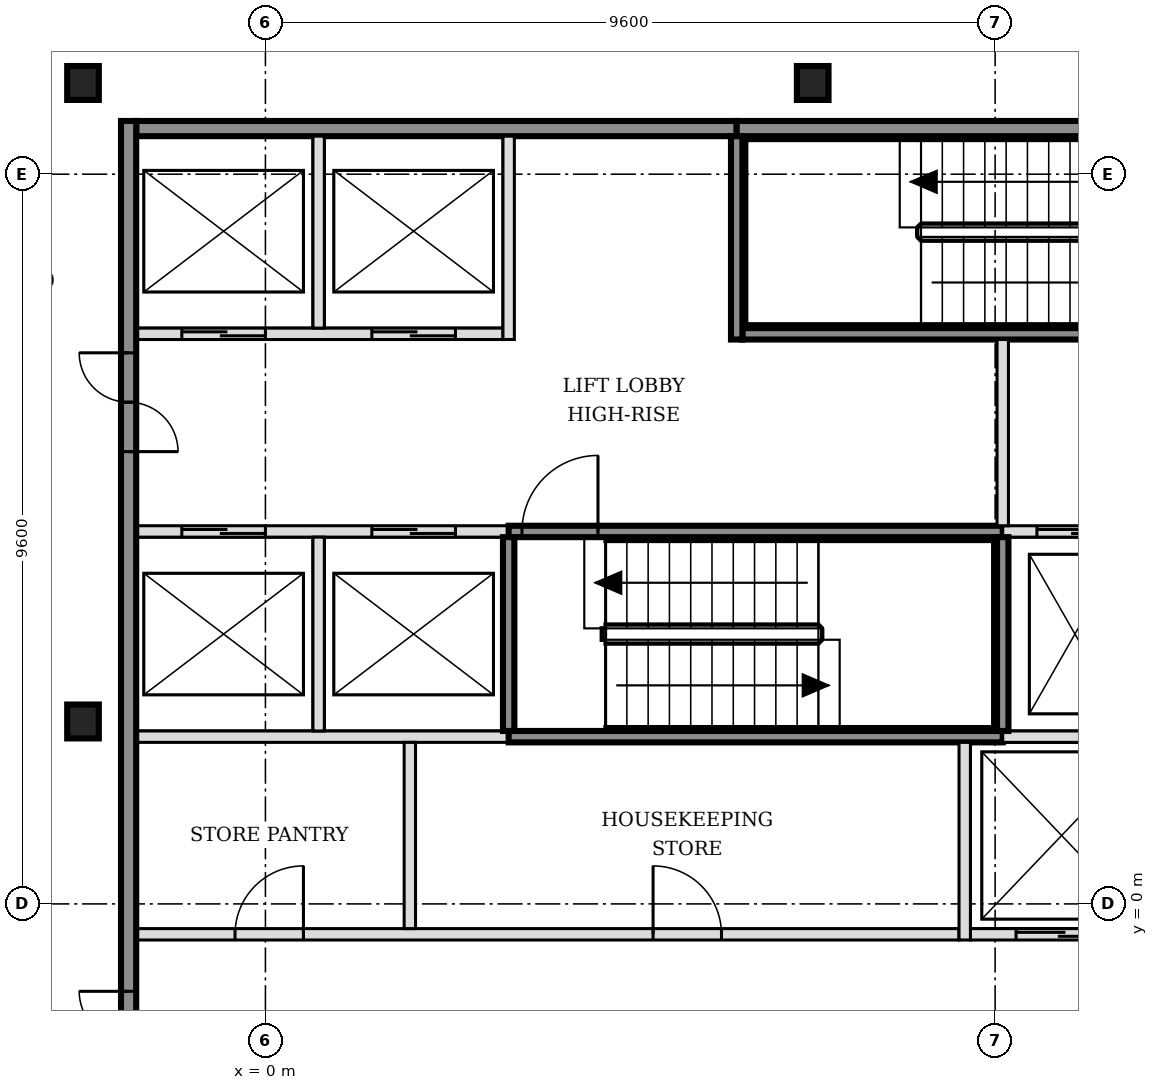
"""IFC4 building model, lengths in metres.
Left out: names, types, materials, properties, quantities, classifications, styles, units other than length and angle.
Written with IfcOpenShell. Run it as: python <this file> out.ifc"""

import sys

from ifc_helpers import new_model, si_unit, direction, frame, frame_2d, origin, origin_2d, place, context, subcontext, project, spatial, rectangle, i_section, extrude, element, fill, save


model = new_model("IFC4")
c1 = context("Model", 3, precision=1e-05, world=origin(), true_north=direction((0.0, 1.0)))
c2 = subcontext(c1, "Body", "Model", "MODEL_VIEW")
j1 = project(units=[si_unit("LENGTHUNIT", "METRE"), si_unit("PLANEANGLEUNIT", "RADIAN")], contexts=[c1])
p1 = place(None, origin())
s1 = spatial("IfcSite", under=j1, at=p1, CompositionType="ELEMENT")
p2 = place(p1, origin())
s2 = spatial("IfcBuilding", under=s1, at=p2, CompositionType="ELEMENT")
p3 = place(p2, frame((0.0, 0.0, 183.0)))
s3 = spatial("IfcBuildingStorey", under=s2, at=p3, CompositionType="ELEMENT", Elevation=183.0)
for number, where, z_axis, x_axis in (
    (1, (-2.4, 2.4, -0.15), (0.0, 0.0, 1.0), (1.0, 0.0, 0.0)),
    (2, (-2.4, 10.8, -0.15), (0.0, 0.0, 1.0), (1.0, 0.0, 0.0)),
    (3, (7.2, 10.8, -0.15), (0.0, 0.0, 1.0), (1.0, 0.0, 0.0)),
):
    element("IfcColumn", number, at=place(p3, frame(where, z_axis=z_axis, x_axis=x_axis)), inside=s3, PredefinedType="COLUMN", context=c2, shape_type="SweptSolid", body=[
        extrude(i_section(OverallWidth=0.416, OverallDepth=0.446, WebThickness=0.039, FlangeThickness=0.063, FilletRadius=0.015, at=origin_2d()), origin(), (0.0, 0.0, 1.0), 3.6),
    ])
p4 = place(p3, frame((-1.7, -0.4, 0.0), z_axis=(0.0, 0.0, 1.0), x_axis=(1.0, 0.0, 0.0)))
e4 = element("IfcWall", 4, at=p4, inside=s3, PredefinedType="PARTITIONING", context=c2, shape_type="SweptSolid", body=[
    extrude(rectangle(XDim=10.825, YDim=0.15, at=frame_2d((5.413, 0.0))), origin(), (0.0, 0.0, 1.0), 3.45),
])
p5 = place(p4, frame((1.3, 0.0, 0.0)))
e5 = element("IfcOpeningElement", 5, at=p5, cuts=e4, PredefinedType="OPENING", context=c2, shape_type="SweptSolid", body=[
    extrude(rectangle(XDim=0.9, YDim=2.1, at=frame_2d((0.45, 1.05))), frame((0.0, 0.085, 0.0), z_axis=(0.0, -1.0, 0.0), x_axis=(1.0, 0.0, 0.0)), (0.0, 0.0, 1.0), 0.17),
])
p6 = place(p4, frame((6.8, 0.0, 0.0)))
e6 = element("IfcOpeningElement", 6, at=p6, cuts=e4, PredefinedType="OPENING", context=c2, shape_type="SweptSolid", body=[
    extrude(rectangle(XDim=0.9, YDim=2.1, at=frame_2d((0.45, 1.05))), frame((0.0, 0.085, 0.0), z_axis=(0.0, -1.0, 0.0), x_axis=(1.0, 0.0, 0.0)), (0.0, 0.0, 1.0), 0.17),
])
p7 = place(p3, frame((9.275, -0.4, 0.0), z_axis=(0.0, 0.0, 1.0), x_axis=(1.0, 0.0, 0.0)))
e7 = element("IfcWall", 7, at=p7, inside=s3, PredefinedType="SOLIDWALL", context=c2, shape_type="SweptSolid", body=[
    extrude(rectangle(XDim=4.95, YDim=0.15, at=frame_2d((2.475, 0.0))), origin(), (0.0, 0.0, 1.0), 3.45),
])
p8 = place(p7, frame((0.6, 0.0, 0.0)))
e8 = element("IfcOpeningElement", 8, at=p8, cuts=e7, PredefinedType="OPENING", context=c2, shape_type="SweptSolid", body=[
    extrude(rectangle(XDim=1.2, YDim=2.1, at=frame_2d((0.6, 1.05))), frame((0.0, 0.085, 0.0), z_axis=(0.0, -1.0, 0.0), x_axis=(1.0, 0.0, 0.0)), (0.0, 0.0, 1.0), 0.17),
])
p9 = place(p7, frame((3.15, 0.0, 0.0)))
e9 = element("IfcOpeningElement", 9, at=p9, cuts=e7, PredefinedType="OPENING", context=c2, shape_type="SweptSolid", body=[
    extrude(rectangle(XDim=1.2, YDim=2.1, at=frame_2d((0.6, 1.05))), frame((0.0, 0.085, 0.0), z_axis=(0.0, -1.0, 0.0), x_axis=(1.0, 0.0, 0.0)), (0.0, 0.0, 1.0), 0.17),
])
p10 = place(p3, frame((-1.7, 2.2, 0.0), z_axis=(0.0, 0.0, 1.0), x_axis=(1.0, 0.0, 0.0)))
e10 = element("IfcWall", 10, at=p10, inside=s3, PredefinedType="SOLIDWALL", context=c2, shape_type="SweptSolid", body=[
    extrude(rectangle(XDim=4.9, YDim=0.15, at=frame_2d((2.45, 0.0))), origin(), (0.0, 0.0, 1.0), 3.45),
])
p11 = place(p3, frame((3.2, 2.2, 0.0), z_axis=(0.0, 0.0, 1.0), x_axis=(1.0, 0.0, 0.0)))
e11 = element("IfcWall", 11, at=p11, inside=s3, PredefinedType="SOLIDWALL", context=c2, shape_type="SweptSolid", body=[
    extrude(rectangle(XDim=6.5, YDim=0.15, at=frame_2d((3.25, 0.0))), origin(), (0.0, 0.0, 1.0), 3.45),
])
p12 = place(p3, frame((9.7, 2.2, 0.0), z_axis=(0.0, 0.0, 1.0), x_axis=(1.0, 0.0, 0.0)))
e12 = element("IfcWall", 12, at=p12, inside=s3, PredefinedType="SOLIDWALL", context=c2, shape_type="SweptSolid", body=[
    extrude(rectangle(XDim=4.525, YDim=0.15, at=frame_2d((2.263, 0.0))), origin(), (0.0, 0.0, 1.0), 3.45),
])
p13 = place(p3, frame((-1.7, 4.9, 0.0), z_axis=(0.0, 0.0, 1.0), x_axis=(1.0, 0.0, 0.0)))
e13 = element("IfcWall", 13, at=p13, inside=s3, PredefinedType="SOLIDWALL", context=c2, shape_type="SweptSolid", body=[
    extrude(rectangle(XDim=4.9, YDim=0.15, at=frame_2d((2.45, 0.0))), origin(), (0.0, 0.0, 1.0), 3.45),
])
p14 = place(p13, frame((0.6, 0.0, 0.0)))
e14 = element("IfcOpeningElement", 14, at=p14, cuts=e13, PredefinedType="OPENING", context=c2, shape_type="SweptSolid", body=[
    extrude(rectangle(XDim=1.1, YDim=2.1, at=frame_2d((0.55, 1.05))), frame((0.0, 0.085, 0.0), z_axis=(0.0, -1.0, 0.0), x_axis=(1.0, 0.0, 0.0)), (0.0, 0.0, 1.0), 0.17),
])
p15 = place(p13, frame((3.1, 0.0, 0.0)))
e15 = element("IfcOpeningElement", 15, at=p15, cuts=e13, PredefinedType="OPENING", context=c2, shape_type="SweptSolid", body=[
    extrude(rectangle(XDim=1.1, YDim=2.1, at=frame_2d((0.55, 1.05))), frame((0.0, 0.085, 0.0), z_axis=(0.0, -1.0, 0.0), x_axis=(1.0, 0.0, 0.0)), (0.0, 0.0, 1.0), 0.17),
])
p16 = place(p3, frame((3.2, 4.9, 0.0), z_axis=(0.0, 0.0, 1.0), x_axis=(1.0, 0.0, 0.0)))
e16 = element("IfcWall", 16, at=p16, inside=s3, PredefinedType="SOLIDWALL", context=c2, shape_type="SweptSolid", body=[
    extrude(rectangle(XDim=6.5, YDim=0.15, at=frame_2d((3.25, 0.0))), origin(), (0.0, 0.0, 1.0), 3.45),
])
p17 = place(p16, frame((0.175, 0.0, 0.0)))
e17 = element("IfcOpeningElement", 17, at=p17, cuts=e16, PredefinedType="OPENING", context=c2, shape_type="SweptSolid", body=[
    extrude(rectangle(XDim=1.0, YDim=2.1, at=frame_2d((0.5, 1.05))), frame((0.0, 0.085, 0.0), z_axis=(0.0, -1.0, 0.0), x_axis=(1.0, 0.0, 0.0)), (0.0, 0.0, 1.0), 0.17),
])
p18 = place(p3, frame((9.7, 4.9, 0.0), z_axis=(0.0, 0.0, 1.0), x_axis=(1.0, 0.0, 0.0)))
e18 = element("IfcWall", 18, at=p18, inside=s3, PredefinedType="SOLIDWALL", context=c2, shape_type="SweptSolid", body=[
    extrude(rectangle(XDim=6.4, YDim=0.15, at=frame_2d((3.2, 0.0))), origin(), (0.0, 0.0, 1.0), 3.45),
])
p19 = place(p18, frame((0.45, 0.0, 0.0)))
e19 = element("IfcOpeningElement", 19, at=p19, cuts=e18, PredefinedType="OPENING", context=c2, shape_type="SweptSolid", body=[
    extrude(rectangle(XDim=1.0, YDim=2.1, at=frame_2d((0.5, 1.05))), frame((0.0, 0.085, 0.0), z_axis=(0.0, -1.0, 0.0), x_axis=(1.0, 0.0, 0.0)), (0.0, 0.0, 1.0), 0.17),
])
p20 = place(p18, frame((2.35, 0.0, 0.0)))
e20 = element("IfcOpeningElement", 20, at=p20, cuts=e18, PredefinedType="OPENING", context=c2, shape_type="SweptSolid", body=[
    extrude(rectangle(XDim=1.0, YDim=2.1, at=frame_2d((0.5, 1.05))), frame((0.0, 0.085, 0.0), z_axis=(0.0, -1.0, 0.0), x_axis=(1.0, 0.0, 0.0)), (0.0, 0.0, 1.0), 0.17),
])
p21 = place(p18, frame((4.7, 0.0, 0.0)))
e21 = element("IfcOpeningElement", 21, at=p21, cuts=e18, PredefinedType="OPENING", context=c2, shape_type="SweptSolid", body=[
    extrude(rectangle(XDim=0.9, YDim=2.1, at=frame_2d((0.45, 1.05))), frame((0.0, 0.085, 0.0), z_axis=(0.0, -1.0, 0.0), x_axis=(1.0, 0.0, 0.0)), (0.0, 0.0, 1.0), 0.17),
])
p22 = place(p3, frame((-1.7, 7.5, 0.0), z_axis=(0.0, 0.0, 1.0), x_axis=(1.0, 0.0, 0.0)))
e22 = element("IfcWall", 22, at=p22, inside=s3, PredefinedType="SOLIDWALL", context=c2, shape_type="SweptSolid", body=[
    extrude(rectangle(XDim=4.825, YDim=0.15, at=frame_2d((2.413, 0.0))), origin(), (0.0, 0.0, 1.0), 3.45),
])
p23 = place(p22, frame((0.6, 0.0, 0.0)))
e23 = element("IfcOpeningElement", 23, at=p23, cuts=e22, PredefinedType="OPENING", context=c2, shape_type="SweptSolid", body=[
    extrude(rectangle(XDim=1.1, YDim=2.1, at=frame_2d((0.55, 1.05))), frame((0.0, 0.085, 0.0), z_axis=(0.0, -1.0, 0.0), x_axis=(1.0, 0.0, 0.0)), (0.0, 0.0, 1.0), 0.17),
])
p24 = place(p22, frame((3.1, 0.0, 0.0)))
e24 = element("IfcOpeningElement", 24, at=p24, cuts=e22, PredefinedType="OPENING", context=c2, shape_type="SweptSolid", body=[
    extrude(rectangle(XDim=1.1, YDim=2.1, at=frame_2d((0.55, 1.05))), frame((0.0, 0.085, 0.0), z_axis=(0.0, -1.0, 0.0), x_axis=(1.0, 0.0, 0.0)), (0.0, 0.0, 1.0), 0.17),
])
p25 = place(p3, frame((6.275, 7.5, 0.0), z_axis=(0.0, 0.0, 1.0), x_axis=(1.0, 0.0, 0.0)))
e25 = element("IfcWall", 25, at=p25, inside=s3, PredefinedType="SOLIDWALL", context=c2, shape_type="SweptSolid", body=[
    extrude(rectangle(XDim=6.425, YDim=0.15, at=frame_2d((3.212, 0.0))), origin(), (0.0, 0.0, 1.0), 3.45),
])
p26 = place(p25, frame((5.225, 0.0, 0.0)))
e26 = element("IfcOpeningElement", 26, at=p26, cuts=e25, PredefinedType="OPENING", context=c2, shape_type="SweptSolid", body=[
    extrude(rectangle(XDim=1.0, YDim=2.1, at=frame_2d((0.5, 1.05))), frame((0.0, 0.085, 0.0), z_axis=(0.0, -1.0, 0.0), x_axis=(1.0, 0.0, 0.0)), (0.0, 0.0, 1.0), 0.17),
])
p27 = place(p3, frame((-1.7, 10.2, 0.0), z_axis=(0.0, 0.0, 1.0), x_axis=(1.0, 0.0, 0.0)))
e27 = element("IfcWall", 27, at=p27, inside=s3, PredefinedType="SOLIDWALL", context=c2, shape_type="SweptSolid", body=[
    extrude(rectangle(XDim=7.9, YDim=0.2, at=frame_2d((3.95, 0.0))), origin(), (0.0, 0.0, 1.0), 3.45),
])
p28 = place(p3, frame((6.2, 10.2, 0.0), z_axis=(0.0, 0.0, 1.0), x_axis=(1.0, 0.0, 0.0)))
e28 = element("IfcWall", 28, at=p28, inside=s3, PredefinedType="SOLIDWALL", context=c2, shape_type="SweptSolid", body=[
    extrude(rectangle(XDim=6.5, YDim=0.2, at=frame_2d((3.25, 0.0))), origin(), (0.0, 0.0, 1.0), 3.45),
])
p29 = place(p3, frame((-1.8, -5.5, 0.0), z_axis=(0.0, 0.0, 1.0), x_axis=(0.0, 1.0, 0.0)))
e29 = element("IfcWall", 29, at=p29, inside=s3, PredefinedType="SOLIDWALL", context=c2, shape_type="SweptSolid", body=[
    extrude(rectangle(XDim=15.8, YDim=0.2, at=frame_2d((7.9, 0.0))), origin(), (0.0, 0.0, 1.0), 3.45),
])
p30 = place(p29, frame((3.05, 0.0, 0.0)))
e30 = element("IfcOpeningElement", 30, at=p30, cuts=e29, PredefinedType="OPENING", context=c2, shape_type="SweptSolid", body=[
    extrude(rectangle(XDim=1.3, YDim=2.1, at=frame_2d((0.65, 1.05))), frame((0.0, 0.11, 0.0), z_axis=(0.0, -1.0, 0.0), x_axis=(1.0, 0.0, 0.0)), (0.0, 0.0, 1.0), 0.22),
])
p31 = place(p29, frame((11.45, 0.0, 0.0)))
e31 = element("IfcOpeningElement", 31, at=p31, cuts=e29, PredefinedType="OPENING", context=c2, shape_type="SweptSolid", body=[
    extrude(rectangle(XDim=1.3, YDim=2.1, at=frame_2d((0.65, 1.05))), frame((0.0, 0.11, 0.0), z_axis=(0.0, -1.0, 0.0), x_axis=(1.0, 0.0, 0.0)), (0.0, 0.0, 1.0), 0.22),
])
p32 = place(p3, frame((0.7, 2.275, 0.0), z_axis=(0.0, 0.0, 1.0), x_axis=(0.0, 1.0, 0.0)))
e32 = element("IfcWall", 32, at=p32, inside=s3, PredefinedType="SOLIDWALL", context=c2, shape_type="SweptSolid", body=[
    extrude(rectangle(XDim=2.55, YDim=0.15, at=frame_2d((1.275, 0.0))), origin(), (0.0, 0.0, 1.0), 3.45),
])
p33 = place(p3, frame((0.7, 7.575, 0.0), z_axis=(0.0, 0.0, 1.0), x_axis=(0.0, 1.0, 0.0)))
e33 = element("IfcWall", 33, at=p33, inside=s3, PredefinedType="SOLIDWALL", context=c2, shape_type="SweptSolid", body=[
    extrude(rectangle(XDim=2.525, YDim=0.15, at=frame_2d((1.263, 0.0))), origin(), (0.0, 0.0, 1.0), 3.45),
])
p34 = place(p3, frame((1.9, -0.325, 0.0), z_axis=(0.0, 0.0, 1.0), x_axis=(0.0, 1.0, 0.0)))
e34 = element("IfcWall", 34, at=p34, inside=s3, PredefinedType="PARTITIONING", context=c2, shape_type="SweptSolid", body=[
    extrude(rectangle(XDim=2.45, YDim=0.15, at=frame_2d((1.225, 0.0))), origin(), (0.0, 0.0, 1.0), 3.45),
])
p35 = place(p3, frame((3.2, 2.275, 0.0), z_axis=(0.0, 0.0, 1.0), x_axis=(0.0, 1.0, 0.0)))
e35 = element("IfcWall", 35, at=p35, inside=s3, PredefinedType="SOLIDWALL", context=c2, shape_type="SweptSolid", body=[
    extrude(rectangle(XDim=2.55, YDim=0.15, at=frame_2d((1.275, 0.0))), origin(), (0.0, 0.0, 1.0), 3.45),
])
for number, where, z_axis, x_axis in (
    (36, (3.2, 7.425, 0.0), (0.0, 0.0, 1.0), (0.0, 1.0, 0.0)),
    (37, (6.2, 7.425, 0.0), (0.0, 0.0, 1.0), (0.0, 1.0, 0.0)),
):
    element("IfcWall", number, at=place(p3, frame(where, z_axis=z_axis, x_axis=x_axis)), inside=s3, PredefinedType="SOLIDWALL", context=c2, shape_type="SweptSolid", body=[
        extrude(rectangle(XDim=2.675, YDim=0.15, at=frame_2d((1.337, 0.0))), origin(), (0.0, 0.0, 1.0), 3.45),
    ])
p36 = place(p3, frame((9.2, -0.475, 0.0), z_axis=(0.0, 0.0, 1.0), x_axis=(0.0, 1.0, 0.0)))
e38 = element("IfcWall", 38, at=p36, inside=s3, PredefinedType="SOLIDWALL", context=c2, shape_type="SweptSolid", body=[
    extrude(rectangle(XDim=2.6, YDim=0.15, at=frame_2d((1.3, 0.0))), origin(), (0.0, 0.0, 1.0), 3.45),
])
p37 = place(p3, frame((9.7, 2.275, 0.0), z_axis=(0.0, 0.0, 1.0), x_axis=(0.0, 1.0, 0.0)))
e39 = element("IfcWall", 39, at=p37, inside=s3, PredefinedType="SOLIDWALL", context=c2, shape_type="SweptSolid", body=[
    extrude(rectangle(XDim=2.55, YDim=0.15, at=frame_2d((1.275, 0.0))), origin(), (0.0, 0.0, 1.0), 3.45),
])
p38 = place(p3, frame((9.7, 4.975, 0.0), z_axis=(0.0, 0.0, 1.0), x_axis=(0.0, 1.0, 0.0)))
e40 = element("IfcWall", 40, at=p38, inside=s3, PredefinedType="SOLIDWALL", context=c2, shape_type="SweptSolid", body=[
    extrude(rectangle(XDim=2.45, YDim=0.15, at=frame_2d((1.225, 0.0))), origin(), (0.0, 0.0, 1.0), 3.45),
])
p39 = place(p3, frame((-14.475, 6.919, 0.0), z_axis=(0.0, 0.0, 1.0), x_axis=(0.707106781187, 0.707106781187, 0.0)))
e41 = element("IfcWall", 41, at=p39, inside=s3, PredefinedType="PARTITIONING", context=c2, shape_type="SweptSolid", body=[
    extrude(rectangle(XDim=22.066, YDim=0.15, at=frame_2d((11.033, 0.0))), origin(), (0.0, 0.0, 1.0), 2.83),
])
p40 = place(p39, frame((18.636, 0.0, 0.0)))
e42 = element("IfcOpeningElement", 42, at=p40, cuts=e41, PredefinedType="OPENING", context=c2, shape_type="SweptSolid", body=[
    extrude(rectangle(XDim=0.9, YDim=2.1, at=frame_2d((0.45, 1.05))), frame((0.0, 0.085, 0.0), z_axis=(0.0, -1.0, 0.0), x_axis=(1.0, 0.0, 0.0)), (0.0, 0.0, 1.0), 0.17),
])
p41 = place(p39, frame((10.648, 0.0, 0.0)))
e43 = element("IfcOpeningElement", 43, at=p41, cuts=e41, PredefinedType="OPENING", context=c2, shape_type="SweptSolid", body=[
    extrude(rectangle(XDim=0.9, YDim=2.1, at=frame_2d((0.45, 1.05))), frame((0.0, 0.085, 0.0), z_axis=(0.0, -1.0, 0.0), x_axis=(1.0, 0.0, 0.0)), (0.0, 0.0, 1.0), 0.17),
])
p42 = place(p39, frame((6.26, 0.0, 0.0)))
e44 = element("IfcOpeningElement", 44, at=p42, cuts=e41, PredefinedType="OPENING", context=c2, shape_type="SweptSolid", body=[
    extrude(rectangle(XDim=0.9, YDim=2.1, at=frame_2d((0.45, 1.05))), frame((0.0, 0.085, 0.0), z_axis=(0.0, -1.0, 0.0), x_axis=(1.0, 0.0, 0.0)), (0.0, 0.0, 1.0), 0.17),
])
p43 = place(p8, origin())
e45 = element("IfcDoor", 45, at=p43, inside=s3, OperationType="DOUBLE_DOOR_SLIDING", PredefinedType="DOOR", context=c2, shape_type="SweptSolid", body=[
    extrude(rectangle(XDim=1.2, YDim=2.1, at=frame_2d((0.6, 1.05))), frame((0.0, 0.025, 0.0), z_axis=(0.0, -1.0, 0.0), x_axis=(1.0, 0.0, 0.0)), (0.0, 0.0, 1.0), 0.05),
])
fill(e8, e45)
p44 = place(p14, origin())
e46 = element("IfcDoor", 46, at=p44, inside=s3, OperationType="DOUBLE_DOOR_SLIDING", PredefinedType="DOOR", context=c2, shape_type="SweptSolid", body=[
    extrude(rectangle(XDim=1.1, YDim=2.1, at=frame_2d((0.55, 1.05))), frame((0.0, 0.025, 0.0), z_axis=(0.0, -1.0, 0.0), x_axis=(1.0, 0.0, 0.0)), (0.0, 0.0, 1.0), 0.05),
])
fill(e14, e46)
p45 = place(p15, origin())
e47 = element("IfcDoor", 47, at=p45, inside=s3, OperationType="DOUBLE_DOOR_SLIDING", PredefinedType="DOOR", context=c2, shape_type="SweptSolid", body=[
    extrude(rectangle(XDim=1.1, YDim=2.1, at=frame_2d((0.55, 1.05))), frame((0.0, 0.025, 0.0), z_axis=(0.0, -1.0, 0.0), x_axis=(1.0, 0.0, 0.0)), (0.0, 0.0, 1.0), 0.05),
])
fill(e15, e47)
p46 = place(p23, origin())
e48 = element("IfcDoor", 48, at=p46, inside=s3, OperationType="DOUBLE_DOOR_SLIDING", PredefinedType="DOOR", context=c2, shape_type="SweptSolid", body=[
    extrude(rectangle(XDim=1.1, YDim=2.1, at=frame_2d((0.55, 1.05))), frame((0.0, 0.025, 0.0), z_axis=(0.0, -1.0, 0.0), x_axis=(1.0, 0.0, 0.0)), (0.0, 0.0, 1.0), 0.05),
])
fill(e23, e48)
p47 = place(p24, origin())
e49 = element("IfcDoor", 49, at=p47, inside=s3, OperationType="DOUBLE_DOOR_SLIDING", PredefinedType="DOOR", context=c2, shape_type="SweptSolid", body=[
    extrude(rectangle(XDim=1.1, YDim=2.1, at=frame_2d((0.55, 1.05))), frame((0.0, 0.025, 0.0), z_axis=(0.0, -1.0, 0.0), x_axis=(1.0, 0.0, 0.0)), (0.0, 0.0, 1.0), 0.05),
])
fill(e24, e49)
p48 = place(p19, origin())
e50 = element("IfcDoor", 50, at=p48, inside=s3, OperationType="DOUBLE_DOOR_SLIDING", PredefinedType="DOOR", context=c2, shape_type="SweptSolid", body=[
    extrude(rectangle(XDim=1.0, YDim=2.1, at=frame_2d((0.5, 1.05))), frame((0.0, 0.025, 0.0), z_axis=(0.0, -1.0, 0.0), x_axis=(1.0, 0.0, 0.0)), (0.0, 0.0, 1.0), 0.05),
])
fill(e19, e50)
p49 = place(p17, origin())
e51 = element("IfcDoor", 51, at=p49, inside=s3, OperationType="SINGLE_SWING_RIGHT", PredefinedType="DOOR", context=c2, shape_type="SweptSolid", body=[
    extrude(rectangle(XDim=1.0, YDim=2.1, at=frame_2d((0.5, 1.05))), frame((0.0, 0.025, 0.0), z_axis=(0.0, -1.0, 0.0), x_axis=(1.0, 0.0, 0.0)), (0.0, 0.0, 1.0), 0.05),
])
fill(e17, e51)
p50 = place(p30, origin())
e52 = element("IfcDoor", 52, at=p50, inside=s3, OperationType="DOUBLE_DOOR_SINGLE_SWING", PredefinedType="DOOR", context=c2, shape_type="SweptSolid", body=[
    extrude(rectangle(XDim=1.3, YDim=2.1, at=frame_2d((0.65, 1.05))), frame((0.0, 0.025, 0.0), z_axis=(0.0, -1.0, 0.0), x_axis=(1.0, 0.0, 0.0)), (0.0, 0.0, 1.0), 0.05),
])
fill(e30, e52)
p51 = place(p31, origin())
e53 = element("IfcDoor", 53, at=p51, inside=s3, OperationType="DOUBLE_DOOR_SINGLE_SWING", PredefinedType="DOOR", context=c2, shape_type="SweptSolid", body=[
    extrude(rectangle(XDim=1.3, YDim=2.1, at=frame_2d((0.65, 1.05))), frame((0.0, 0.025, 0.0), z_axis=(0.0, -1.0, 0.0), x_axis=(1.0, 0.0, 0.0)), (0.0, 0.0, 1.0), 0.05),
])
fill(e31, e53)
p52 = place(p5, origin())
e54 = element("IfcDoor", 54, at=p52, inside=s3, OperationType="SINGLE_SWING_RIGHT", PredefinedType="DOOR", context=c2, shape_type="SweptSolid", body=[
    extrude(rectangle(XDim=0.9, YDim=2.1, at=frame_2d((0.45, 1.05))), frame((0.0, 0.025, 0.0), z_axis=(0.0, -1.0, 0.0), x_axis=(1.0, 0.0, 0.0)), (0.0, 0.0, 1.0), 0.05),
])
fill(e5, e54)
p53 = place(p6, origin())
e55 = element("IfcDoor", 55, at=p53, inside=s3, OperationType="SINGLE_SWING_LEFT", PredefinedType="DOOR", context=c2, shape_type="SweptSolid", body=[
    extrude(rectangle(XDim=0.9, YDim=2.1, at=frame_2d((0.45, 1.05))), frame((0.0, 0.025, 0.0), z_axis=(0.0, -1.0, 0.0), x_axis=(1.0, 0.0, 0.0)), (0.0, 0.0, 1.0), 0.05),
])
fill(e6, e55)
save(model, sys.argv[1])
